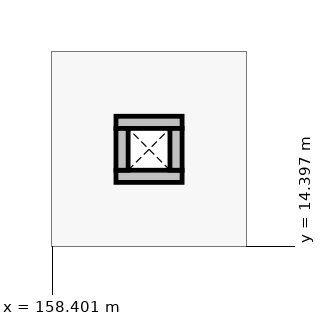
"""IFC4 building model, lengths in metres.
Left out: names, types, materials, properties, quantities, classifications, styles, units other than length and angle.
Written with IfcOpenShell. Run it as: python <this file> out.ifc"""

import sys

from ifc_helpers import new_model, si_unit, direction, frame, frame_2d, origin, place, context, subcontext, project, spatial, rectangle, extrude, element, save


model = new_model("IFC4")
c1 = context("Model", 3, precision=1e-05, world=origin(), true_north=direction((0.0, 1.0)))
c2 = subcontext(c1, "Body", "Model", "MODEL_VIEW")
j1 = project(units=[si_unit("LENGTHUNIT", "METRE"), si_unit("PLANEANGLEUNIT", "RADIAN")], contexts=[c1])
p1 = place(None, origin())
s1 = spatial("IfcSite", under=j1, at=p1, CompositionType="ELEMENT")
p2 = place(p1, origin())
s2 = spatial("IfcBuilding", under=s1, at=p2, CompositionType="ELEMENT")
p3 = place(p2, frame((0.0, 0.0, 8.4)))
s3 = spatial("IfcBuildingStorey", under=s2, at=p3, CompositionType="ELEMENT", Elevation=8.4)
for number, where, z_axis, x_axis in (
    (1, (159.24, 15.32, 0.0), (0.0, 0.0, 1.0), (1.0, 0.0, 0.0)),
    (2, (159.24, 16.03, 0.0), (0.0, 0.0, 1.0), (1.0, 0.0, 0.0)),
):
    element("IfcWall", number, at=place(p3, frame(where, z_axis=z_axis, x_axis=x_axis)), inside=s3, PredefinedType="PARTITIONING", context=c2, shape_type="SweptSolid", body=[
        extrude(rectangle(XDim=0.87, YDim=0.16, at=frame_2d((0.435, 0.0))), origin(), (0.0, 0.0, 1.0), 3.35),
    ])
for number, where, z_axis, x_axis in (
    (3, (159.32, 15.4, 0.0), (0.0, 0.0, 1.0), (0.0, 1.0, 0.0)),
    (4, (160.03, 15.4, 0.0), (0.0, 0.0, 1.0), (0.0, 1.0, 0.0)),
):
    element("IfcWall", number, at=place(p3, frame(where, z_axis=z_axis, x_axis=x_axis)), inside=s3, PredefinedType="PARTITIONING", context=c2, shape_type="SweptSolid", body=[
        extrude(rectangle(XDim=0.55, YDim=0.16, at=frame_2d((0.275, 0.0))), origin(), (0.0, 0.0, 1.0), 3.35),
    ])
save(model, sys.argv[1])
